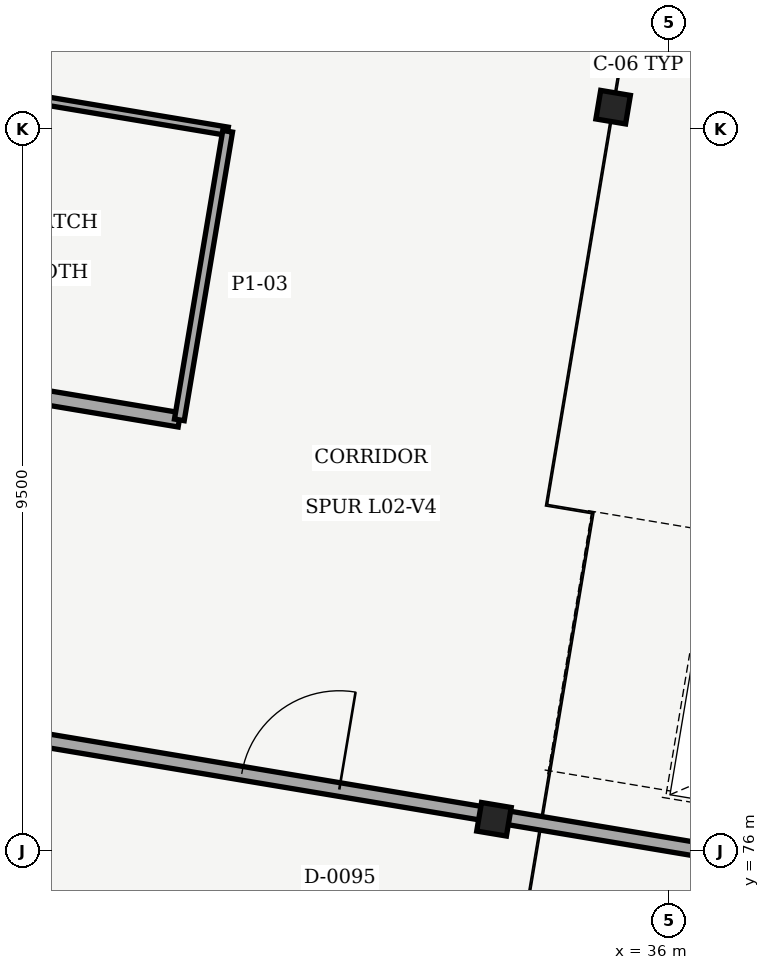
"""IFC4 building model, lengths in metres.
Left out: names, types, materials, properties, quantities, classifications, styles, units other than length and angle.
Written with IfcOpenShell. Run it as: python <this file> out.ifc"""

import sys

from ifc_helpers import new_model, si_unit, direction, frame, frame_2d, origin, origin_with_axes, origin_2d, place, context, subcontext, project, spatial, rectangle, i_section, extrude, element, fill, save


model = new_model("IFC4")
c1 = context("Model", 3, precision=1e-05, world=origin(), true_north=direction((0.0, 1.0)))
c2 = subcontext(c1, "Body", "Model", "MODEL_VIEW")
j1 = project(units=[si_unit("LENGTHUNIT", "METRE"), si_unit("PLANEANGLEUNIT", "RADIAN")], contexts=[c1])
p1 = place(None, origin())
s1 = spatial("IfcSite", under=j1, at=p1, CompositionType="ELEMENT")
p2 = place(p1, origin())
s2 = spatial("IfcBuilding", under=s1, at=p2, CompositionType="ELEMENT")
p3 = place(p2, frame((0.0, 0.0, 9.6)))
s3 = spatial("IfcBuildingStorey", under=s2, at=p3, CompositionType="ELEMENT", Elevation=9.6)
for number, where, z_axis, x_axis in (
    (1, (33.698, 76.413, 0.0), (0.0, 0.0, 1.0), (0.986, -0.165, 0.0)),
    (2, (35.266, 85.783, 0.0), (0.0, 0.0, 1.0), (0.986, -0.165, 0.0)),
):
    element("IfcColumn", number, at=place(p3, frame(where, z_axis=z_axis, x_axis=x_axis)), inside=s3, PredefinedType="COLUMN", context=c2, shape_type="SweptSolid", body=[
        extrude(i_section(OverallWidth=0.396, OverallDepth=0.381, WebThickness=0.019, FlangeThickness=0.03, FilletRadius=0.015, at=origin_2d()), origin(), (0.0, 0.0, 1.0), 4.8),
    ])
p4 = place(p3, frame((7.244, 80.891, 0.0), z_axis=(0.0, 0.0, 1.0), x_axis=(0.986286301143, -0.165043425126, 0.0)))
e3 = element("IfcWall", 3, at=p4, inside=s3, PredefinedType="PARTITIONING", context=c2, shape_type="SweptSolid", body=[
    extrude(rectangle(XDim=44.66, YDim=0.18, at=frame_2d((22.33, 0.0))), origin(), (0.0, 0.0, 1.0), 3.38),
])
p5 = place(p4, frame((23.458, 0.0, 0.0)))
e4 = element("IfcOpeningElement", 4, at=p5, cuts=e3, PredefinedType="OPENING", context=c2, shape_type="SweptSolid", body=[
    extrude(rectangle(XDim=1.3, YDim=2.15, at=frame_2d((0.65, 1.075))), frame((0.0, 0.1, 0.0), z_axis=(0.0, -1.0, 0.0), x_axis=(1.0, 0.0, 0.0)), (0.0, 0.0, 1.0), 0.2),
])
p6 = place(p3, frame((53.115, 84.418, 0.0), z_axis=(0.0, 0.0, 1.0), x_axis=(-0.986286301143, 0.165043425126, 0.0)))
e5 = element("IfcWall", 5, at=p6, inside=s3, PredefinedType="PARTITIONING", context=c2, shape_type="SweptSolid", body=[
    extrude(rectangle(XDim=44.66, YDim=0.2, at=frame_2d((22.33, 0.0))), origin(), (0.0, 0.0, 1.0), 3.38),
])
p7 = place(p6, frame((21.63, 0.0, 0.0)))
e6 = element("IfcOpeningElement", 6, at=p7, cuts=e5, PredefinedType="OPENING", context=c2, shape_type="SweptSolid", body=[
    extrude(rectangle(XDim=1.4, YDim=2.2, at=frame_2d((0.7, 1.1))), frame((0.0, 0.11, 0.0), z_axis=(0.0, -1.0, 0.0), x_axis=(1.0, 0.0, 0.0)), (0.0, 0.0, 1.0), 0.22),
])
p8 = place(p3, frame((29.558, 81.669, 0.0), z_axis=(0.0, 0.0, 1.0), x_axis=(-0.986285271059, 0.165049580706, 0.0)))
e7 = element("IfcWall", 7, at=p8, inside=s3, PredefinedType="PARTITIONING", context=c2, shape_type="SweptSolid", body=[
    extrude(rectangle(XDim=12.9, YDim=0.19, at=frame_2d((6.45, 0.0))), origin(), (0.0, 0.0, 1.0), 3.38),
])
p9 = place(p3, frame((17.471, 87.595, 0.0), z_axis=(0.0, 0.0, 1.0), x_axis=(0.986284755488, -0.165052661574, 0.0)))
e8 = element("IfcWall", 8, at=p9, inside=s3, PredefinedType="PARTITIONING", context=c2, shape_type="SweptSolid", body=[
    extrude(rectangle(XDim=12.9, YDim=0.11, at=frame_2d((6.45, 0.0))), origin(), (0.0, 0.0, 1.0), 3.38),
])
p10 = place(p9, frame((4.573, 0.0, 0.0)))
e9 = element("IfcOpeningElement", 9, at=p10, cuts=e8, PredefinedType="OPENING", context=c2, shape_type="SweptSolid", body=[
    extrude(rectangle(XDim=1.15, YDim=2.15, at=frame_2d((0.575, 1.075))), frame((0.0, 0.065, 0.0), z_axis=(0.0, -1.0, 0.0), x_axis=(1.0, 0.0, 0.0)), (0.0, 0.0, 1.0), 0.13),
])
p11 = place(p3, frame((30.194, 85.466, 0.0), z_axis=(0.0, 0.0, 1.0), x_axis=(-0.165005682962, -0.986292616108, 0.0)))
e10 = element("IfcWall", 10, at=p11, inside=s3, PredefinedType="PARTITIONING", context=c2, shape_type="SweptSolid", body=[
    extrude(rectangle(XDim=3.85, YDim=0.13, at=frame_2d((1.925, 0.0))), origin(), (0.0, 0.0, 1.0), 3.38),
])
p12 = place(p5, origin_with_axes())
e11 = element("IfcDoor", 11, at=p12, inside=s3, OperationType="SINGLE_SWING_RIGHT", PredefinedType="DOOR", context=c2, shape_type="SweptSolid", body=[
    extrude(rectangle(XDim=1.3, YDim=2.15, at=frame_2d((0.65, 1.075))), frame((0.0, 0.025, 0.0), z_axis=(0.0, -1.0, 0.0), x_axis=(1.0, 0.0, 0.0)), (0.0, 0.0, 1.0), 0.05),
])
fill(e4, e11)
save(model, sys.argv[1])
